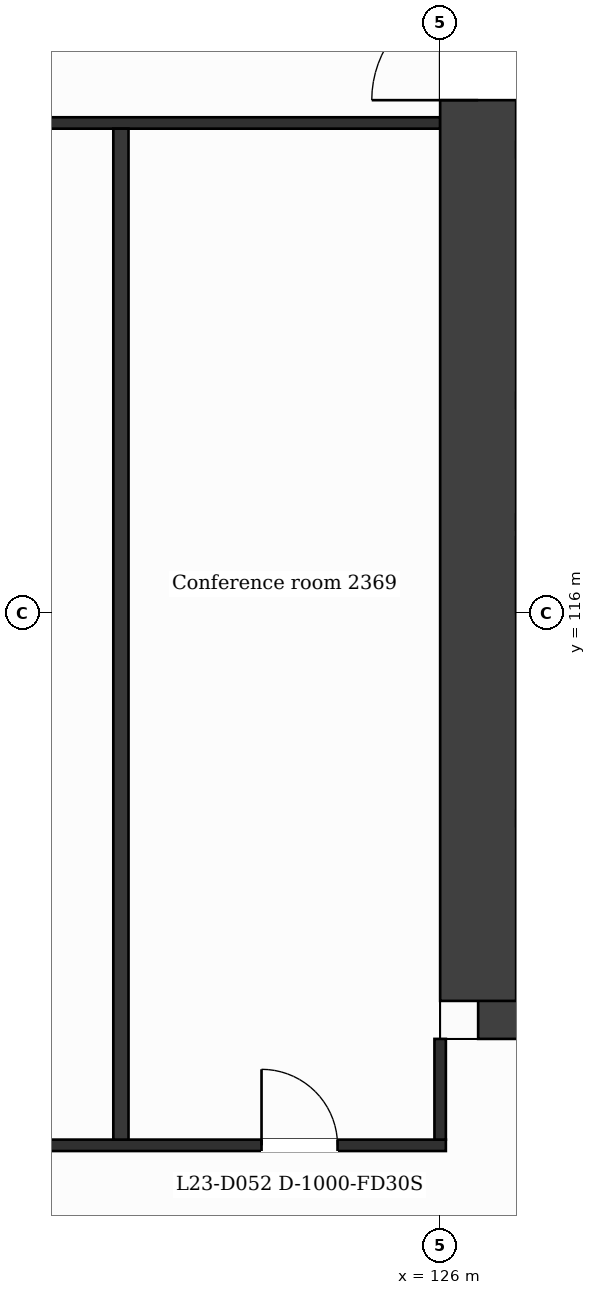
"""IFC4 building model, lengths in metres.
Left out: names, types, materials, properties, quantities, classifications, styles, units other than length and angle.
Written with IfcOpenShell. Run it as: python <this file> out.ifc"""

import sys

from ifc_helpers import new_model, si_unit, direction, frame, frame_2d, origin, place, context, subcontext, project, spatial, rectangle, extrude, element, fill, save


model = new_model("IFC4")
c1 = context("Model", 3, precision=1e-05, world=origin(), true_north=direction((0.0, 1.0)))
c2 = subcontext(c1, "Body", "Model", "MODEL_VIEW")
j1 = project(units=[si_unit("LENGTHUNIT", "METRE"), si_unit("PLANEANGLEUNIT", "RADIAN")], contexts=[c1])
p1 = place(None, origin())
s1 = spatial("IfcSite", under=j1, at=p1, CompositionType="ELEMENT")
p2 = place(p1, origin())
s2 = spatial("IfcBuilding", under=s1, at=p2, CompositionType="ELEMENT")
p3 = place(p2, frame((0.0, 0.0, 102.1)))
s3 = spatial("IfcBuildingStorey", under=s2, at=p3, CompositionType="ELEMENT", Elevation=102.1)
p4 = place(p3, frame((140.559, 110.9, 0.0), z_axis=(0.0, 0.0, 1.0), x_axis=(-1.0, 0.0, 0.0)))
e1 = element("IfcWall", 1, at=p4, inside=s3, PredefinedType="SHEAR", context=c2, shape_type="SweptSolid", body=[
    extrude(rectangle(XDim=14.059, YDim=1.0, at=frame_2d((7.029, 0.0))), origin(), (0.0, 0.0, 1.0), 3.7),
])
p5 = place(p4, frame((6.858, 0.0, 0.0)))
e2 = element("IfcOpeningElement", 2, at=p5, cuts=e1, PredefinedType="OPENING", context=c2, shape_type="SweptSolid", body=[
    extrude(rectangle(XDim=1.4, YDim=2.1, at=frame_2d((0.7, 1.05))), frame((0.0, 0.51, 0.0), z_axis=(0.0, -1.0, 0.0), x_axis=(1.0, 0.0, 0.0)), (0.0, 0.0, 1.0), 1.02),
])
p6 = place(p3, frame((126.5, 110.9, 0.0), z_axis=(0.0, 0.0, 1.0), x_axis=(0.0, 1.0, 0.0)))
e3 = element("IfcWall", 3, at=p6, inside=s3, PredefinedType="SHEAR", context=c2, shape_type="SweptSolid", body=[
    extrude(rectangle(XDim=21.0, YDim=1.0, at=frame_2d((10.5, 0.0))), origin(), (0.0, 0.0, 1.0), 3.7),
])
p7 = place(p6, frame((11.85, 0.0, 0.0)))
e4 = element("IfcOpeningElement", 4, at=p7, cuts=e3, PredefinedType="OPENING", context=c2, shape_type="SweptSolid", body=[
    extrude(rectangle(XDim=1.4, YDim=2.1, at=frame_2d((0.7, 1.05))), frame((0.0, 0.51, 0.0), z_axis=(0.0, -1.0, 0.0), x_axis=(1.0, 0.0, 0.0)), (0.0, 0.0, 1.0), 1.02),
])
p8 = place(p3, frame((100.725, 109.0, 0.0), z_axis=(0.0, 0.0, 1.0), x_axis=(1.0, 0.0, 0.0)))
e5 = element("IfcWall", 5, at=p8, inside=s3, PredefinedType="PARTITIONING", context=c2, shape_type="SweptSolid", body=[
    extrude(rectangle(XDim=25.35, YDim=0.15, at=frame_2d((12.675, 0.0))), origin(), (0.0, 0.0, 1.0), 3.38),
])
p9 = place(p8, frame((2.3, 0.0, 0.0)))
e6 = element("IfcOpeningElement", 6, at=p9, cuts=e5, PredefinedType="OPENING", context=c2, shape_type="SweptSolid", body=[
    extrude(rectangle(XDim=1.0, YDim=2.1, at=frame_2d((0.5, 1.05))), frame((0.0, 0.085, 0.0), z_axis=(0.0, -1.0, 0.0), x_axis=(1.0, 0.0, 0.0)), (0.0, 0.0, 1.0), 0.17),
])
p10 = place(p8, frame((6.125, 0.0, 0.0)))
e7 = element("IfcOpeningElement", 7, at=p10, cuts=e5, PredefinedType="OPENING", context=c2, shape_type="SweptSolid", body=[
    extrude(rectangle(XDim=1.0, YDim=2.1, at=frame_2d((0.5, 1.05))), frame((0.0, 0.085, 0.0), z_axis=(0.0, -1.0, 0.0), x_axis=(1.0, 0.0, 0.0)), (0.0, 0.0, 1.0), 0.17),
])
p11 = place(p8, frame((10.075, 0.0, 0.0)))
e8 = element("IfcOpeningElement", 8, at=p11, cuts=e5, PredefinedType="OPENING", context=c2, shape_type="SweptSolid", body=[
    extrude(rectangle(XDim=1.0, YDim=2.1, at=frame_2d((0.5, 1.05))), frame((0.0, 0.085, 0.0), z_axis=(0.0, -1.0, 0.0), x_axis=(1.0, 0.0, 0.0)), (0.0, 0.0, 1.0), 0.17),
])
p12 = place(p8, frame((14.275, 0.0, 0.0)))
e9 = element("IfcOpeningElement", 9, at=p12, cuts=e5, PredefinedType="OPENING", context=c2, shape_type="SweptSolid", body=[
    extrude(rectangle(XDim=1.0, YDim=2.1, at=frame_2d((0.5, 1.05))), frame((0.0, 0.085, 0.0), z_axis=(0.0, -1.0, 0.0), x_axis=(1.0, 0.0, 0.0)), (0.0, 0.0, 1.0), 0.17),
])
p13 = place(p8, frame((17.85, 0.0, 0.0)))
e10 = element("IfcOpeningElement", 10, at=p13, cuts=e5, PredefinedType="OPENING", context=c2, shape_type="SweptSolid", body=[
    extrude(rectangle(XDim=1.0, YDim=2.1, at=frame_2d((0.5, 1.05))), frame((0.0, 0.085, 0.0), z_axis=(0.0, -1.0, 0.0), x_axis=(1.0, 0.0, 0.0)), (0.0, 0.0, 1.0), 0.17),
])
p14 = place(p8, frame((22.925, 0.0, 0.0)))
e11 = element("IfcOpeningElement", 11, at=p14, cuts=e5, PredefinedType="OPENING", context=c2, shape_type="SweptSolid", body=[
    extrude(rectangle(XDim=1.0, YDim=2.1, at=frame_2d((0.5, 1.05))), frame((0.0, 0.085, 0.0), z_axis=(0.0, -1.0, 0.0), x_axis=(1.0, 0.0, 0.0)), (0.0, 0.0, 1.0), 0.17),
])
p15 = place(p3, frame((127.0, 113.3, 0.0), z_axis=(0.0, 0.0, 1.0), x_axis=(1.0, 0.0, 0.0)))
e12 = element("IfcWall", 12, at=p15, inside=s3, PredefinedType="PARTITIONING", context=c2, shape_type="SweptSolid", body=[
    extrude(rectangle(XDim=4.673, YDim=0.2, at=frame_2d((2.336, 0.0))), origin(), (0.0, 0.0, 1.0), 3.38),
])
p16 = place(p15, frame((0.472, 0.0, 0.0)))
e13 = element("IfcOpeningElement", 13, at=p16, cuts=e12, PredefinedType="OPENING", context=c2, shape_type="SweptSolid", body=[
    extrude(rectangle(XDim=1.1, YDim=2.1, at=frame_2d((0.55, 1.05))), frame((0.0, 0.11, 0.0), z_axis=(0.0, -1.0, 0.0), x_axis=(1.0, 0.0, 0.0)), (0.0, 0.0, 1.0), 0.22),
])
p17 = place(p3, frame((100.8, 122.45, 0.0), z_axis=(0.0, 0.0, 1.0), x_axis=(1.0, 0.0, 0.0)))
e14 = element("IfcWall", 14, at=p17, inside=s3, PredefinedType="PARTITIONING", context=c2, shape_type="SweptSolid", body=[
    extrude(rectangle(XDim=25.2, YDim=0.15, at=frame_2d((12.6, 0.0))), origin(), (0.0, 0.0, 1.0), 3.38),
])
p18 = place(p3, frame((121.8, 109.075, 0.0), z_axis=(0.0, 0.0, 1.0), x_axis=(0.0, 1.0, 0.0)))
e15 = element("IfcWall", 15, at=p18, inside=s3, PredefinedType="PARTITIONING", context=c2, shape_type="SweptSolid", body=[
    extrude(rectangle(XDim=13.3, YDim=0.2, at=frame_2d((6.65, 0.0))), origin(), (0.0, 0.0, 1.0), 3.38),
])
p19 = place(p3, frame((126.0, 109.075, 0.0), z_axis=(0.0, 0.0, 1.0), x_axis=(0.0, 1.0, 0.0)))
e16 = element("IfcWall", 16, at=p19, inside=s3, PredefinedType="PARTITIONING", context=c2, shape_type="SweptSolid", body=[
    extrude(rectangle(XDim=1.325, YDim=0.15, at=frame_2d((0.663, 0.0))), origin(), (0.0, 0.0, 1.0), 3.38),
])
p20 = place(p14, origin())
e17 = element("IfcDoor", 17, at=p20, inside=s3, OperationType="SINGLE_SWING_LEFT", PredefinedType="DOOR", context=c2, shape_type="SweptSolid", body=[
    extrude(rectangle(XDim=1.0, YDim=2.1, at=frame_2d((0.5, 1.05))), frame((0.0, 0.025, 0.0), z_axis=(0.0, -1.0, 0.0), x_axis=(1.0, 0.0, 0.0)), (0.0, 0.0, 1.0), 0.05),
])
fill(e11, e17)
p21 = place(p7, origin())
e18 = element("IfcDoor", 18, at=p21, inside=s3, OperationType="SINGLE_SWING_LEFT", PredefinedType="DOOR", context=c2, shape_type="SweptSolid", body=[
    extrude(rectangle(XDim=1.4, YDim=2.1, at=frame_2d((0.7, 1.05))), frame((0.0, 0.025, 0.0), z_axis=(0.0, -1.0, 0.0), x_axis=(1.0, 0.0, 0.0)), (0.0, 0.0, 1.0), 0.05),
])
fill(e4, e18)
save(model, sys.argv[1])
